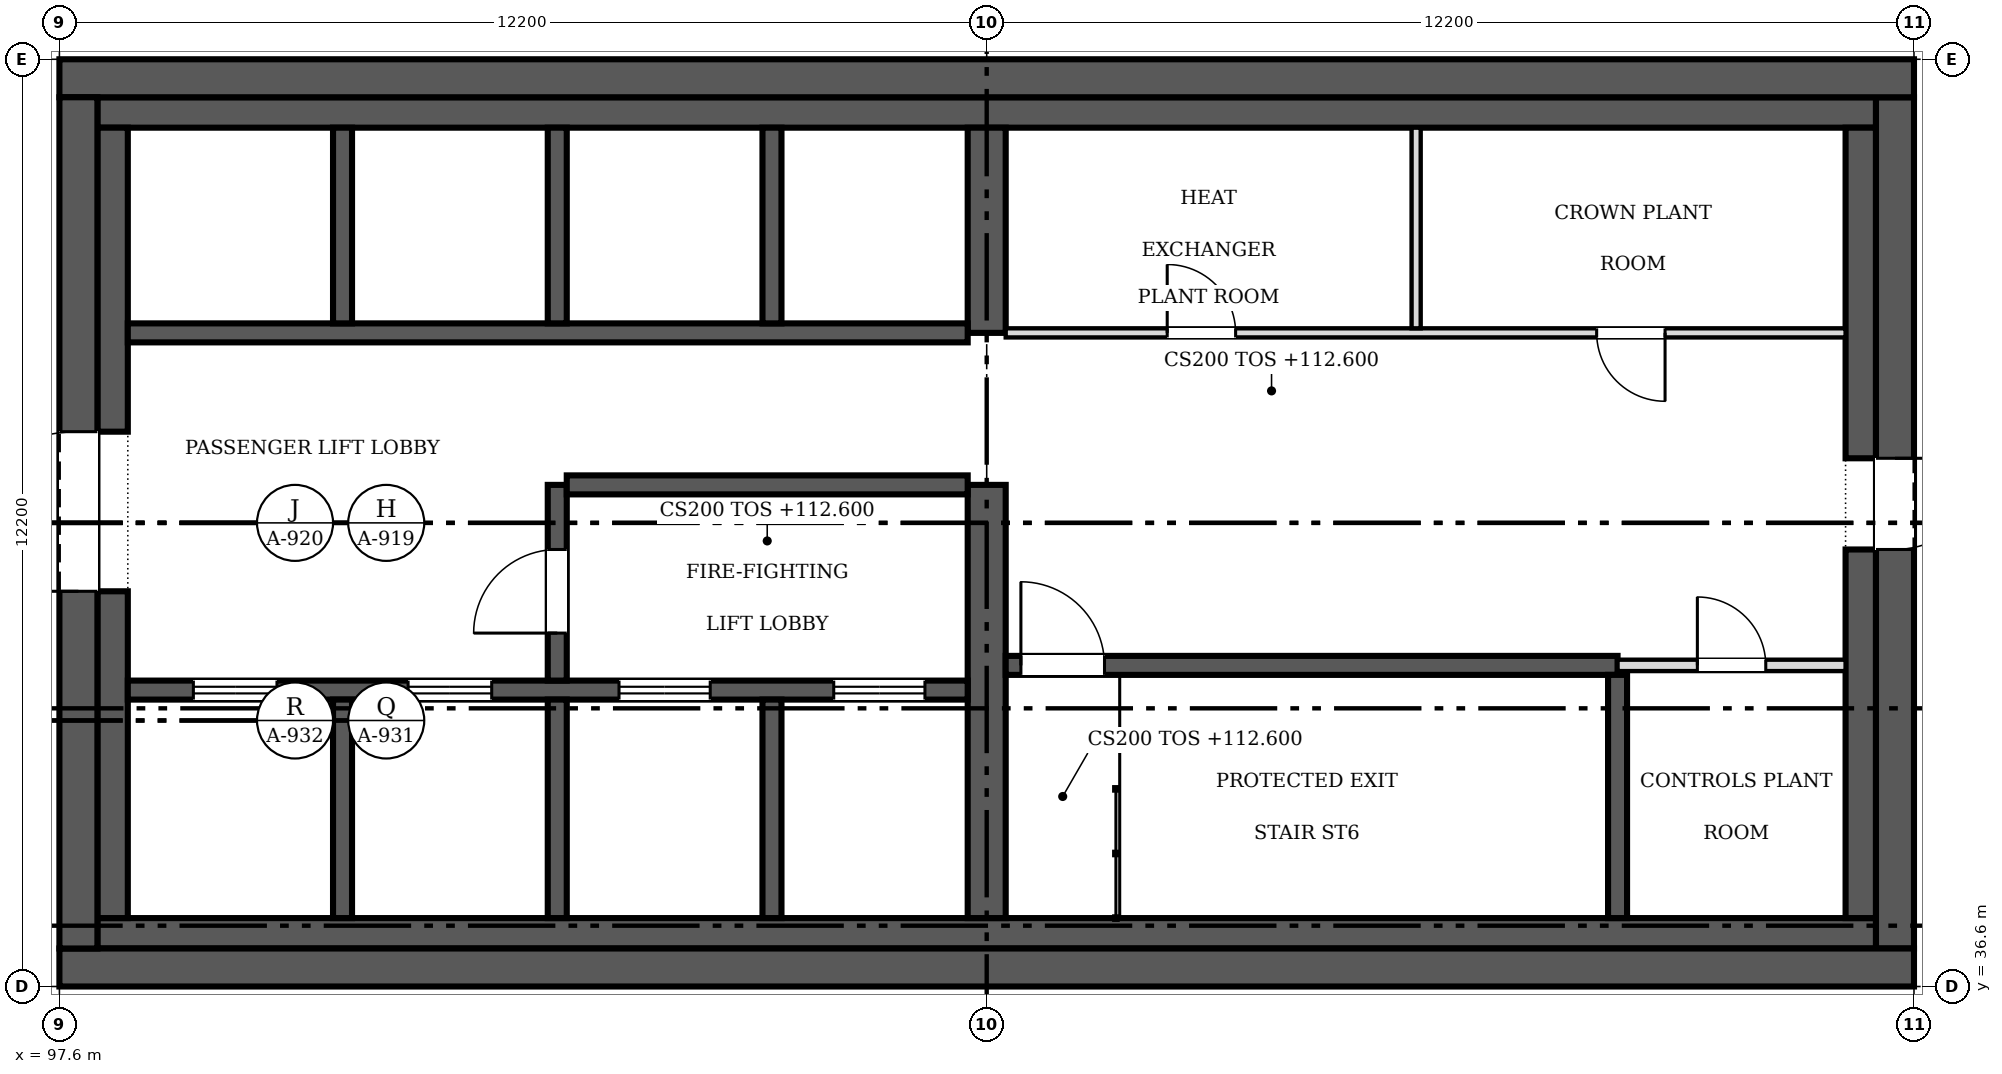
"""IFC4 building model, lengths in metres.
Left out: names, types, materials, properties, quantities, classifications, styles, units other than length and angle.
Written with IfcOpenShell. Run it as: python <this file> out.ifc"""

import sys

from ifc_helpers import new_model, si_unit, direction, frame, frame_2d, origin, place, context, subcontext, project, spatial, rectangle, extrude, source, transform, mapped, element, fill, save


model = new_model("IFC4")
c1 = context("Model", 3, precision=1e-05, world=origin(), true_north=direction((0.0, 1.0)))
c2 = subcontext(c1, "Body", "Model", "MODEL_VIEW")
j1 = project(units=[si_unit("LENGTHUNIT", "METRE"), si_unit("PLANEANGLEUNIT", "RADIAN")], contexts=[c1])
p1 = place(None, origin())
s1 = spatial("IfcSite", under=j1, at=p1, CompositionType="ELEMENT")
p2 = place(p1, origin())
s2 = spatial("IfcBuilding", under=s1, at=p2, CompositionType="ELEMENT")
p3 = place(p2, frame((0.0, 0.0, 112.6)))
s3 = spatial("IfcBuildingStorey", under=s2, at=p3, CompositionType="ELEMENT", Elevation=112.6)
p4 = place(p3, frame((122.0, 36.85, 0.0), z_axis=(0.0, 0.0, 1.0), x_axis=(-1.0, 0.0, 0.0)))
e1 = element("IfcWall", 1, at=p4, inside=s3, PredefinedType="SHEAR", context=c2, shape_type="SweptSolid", body=[
    extrude(rectangle(XDim=24.4, YDim=0.5, at=frame_2d((12.2, 0.0))), origin(), (0.0, 0.0, 1.0), 3.5),
])
p5 = place(p3, frame((97.85, 37.1, 0.0), z_axis=(0.0, 0.0, 1.0), x_axis=(0.0, 1.0, 0.0)))
e2 = element("IfcWall", 2, at=p5, inside=s3, PredefinedType="SHEAR", context=c2, shape_type="SweptSolid", body=[
    extrude(rectangle(XDim=11.2, YDim=0.5, at=frame_2d((5.6, 0.0))), origin(), (0.0, 0.0, 1.0), 3.5),
])
m1 = source(origin(), c2, "Body", "SweptSolid", [
    extrude(rectangle(XDim=2.1, YDim=2.4, at=frame_2d((1.05, 1.2))), frame((0.0, 0.26, 0.0), z_axis=(0.0, -1.0, 0.0), x_axis=(1.0, 0.0, 0.0)), (0.0, 0.0, 1.0), 0.52),
])
p6 = place(p5, frame((4.7, 0.0, 0.0)))
e3 = element("IfcOpeningElement", 3, at=p6, cuts=e2, PredefinedType="OPENING", context=c2, shape_type="MappedRepresentation", body=[
    mapped(m1, transform((0.0, 0.0, 0.0), scale=1.0)),
])
p7 = place(p3, frame((97.6, 48.55, 0.0), z_axis=(0.0, 0.0, 1.0), x_axis=(1.0, 0.0, 0.0)))
e4 = element("IfcWall", 4, at=p7, inside=s3, PredefinedType="SHEAR", context=c2, shape_type="SweptSolid", body=[
    extrude(rectangle(XDim=24.4, YDim=0.5, at=frame_2d((12.2, 0.0))), origin(), (0.0, 0.0, 1.0), 3.5),
])
p8 = place(p3, frame((121.75, 48.3, 0.0), z_axis=(0.0, 0.0, 1.0), x_axis=(0.0, -1.0, 0.0)))
e5 = element("IfcWall", 5, at=p8, inside=s3, PredefinedType="SHEAR", context=c2, shape_type="SweptSolid", body=[
    extrude(rectangle(XDim=11.2, YDim=0.5, at=frame_2d((5.6, 0.0))), origin(), (0.0, 0.0, 1.0), 3.5),
])
m2 = source(origin(), c2, "Body", "SweptSolid", [
    extrude(rectangle(XDim=1.2, YDim=2.1, at=frame_2d((0.6, 1.05))), frame((0.0, 0.26, 0.0), z_axis=(0.0, -1.0, 0.0), x_axis=(1.0, 0.0, 0.0)), (0.0, 0.0, 1.0), 0.52),
])
p9 = place(p8, frame((4.75, 0.0, 0.0)))
e6 = element("IfcOpeningElement", 6, at=p9, cuts=e5, PredefinedType="OPENING", context=c2, shape_type="MappedRepresentation", body=[
    mapped(m2, transform((0.0, 0.0, 0.0), scale=1.0)),
])
for number, where, z_axis, x_axis in (
    (7, (98.1, 37.3, 0.0), (0.0, 0.0, 1.0), (1.0, 0.0, 0.0)),
    (8, (98.1, 48.1, 0.0), (0.0, 0.0, 1.0), (1.0, 0.0, 0.0)),
):
    element("IfcWall", number, at=place(p3, frame(where, z_axis=z_axis, x_axis=x_axis)), inside=s3, PredefinedType="SOLIDWALL", context=c2, shape_type="SweptSolid", body=[
        extrude(rectangle(XDim=23.4, YDim=0.4, at=frame_2d((11.7, 0.0))), origin(), (0.0, 0.0, 1.0), 3.5),
    ])
p10 = place(p3, frame((98.3, 37.5, 0.0), z_axis=(0.0, 0.0, 1.0), x_axis=(0.0, 1.0, 0.0)))
e9 = element("IfcWall", 9, at=p10, inside=s3, PredefinedType="SOLIDWALL", context=c2, shape_type="SweptSolid", body=[
    extrude(rectangle(XDim=4.3, YDim=0.4, at=frame_2d((2.15, 0.0))), origin(), (0.0, 0.0, 1.0), 3.5),
])
p11 = place(p3, frame((98.3, 43.9, 0.0), z_axis=(0.0, 0.0, 1.0), x_axis=(0.0, 1.0, 0.0)))
e10 = element("IfcWall", 10, at=p11, inside=s3, PredefinedType="SOLIDWALL", context=c2, shape_type="SweptSolid", body=[
    extrude(rectangle(XDim=4.0, YDim=0.4, at=frame_2d((2.0, 0.0))), origin(), (0.0, 0.0, 1.0), 3.5),
])
p12 = place(p3, frame((121.3, 37.5, 0.0), z_axis=(0.0, 0.0, 1.0), x_axis=(0.0, 1.0, 0.0)))
e11 = element("IfcWall", 11, at=p12, inside=s3, PredefinedType="SOLIDWALL", context=c2, shape_type="SweptSolid", body=[
    extrude(rectangle(XDim=4.85, YDim=0.4, at=frame_2d((2.425, 0.0))), origin(), (0.0, 0.0, 1.0), 3.5),
])
p13 = place(p3, frame((121.3, 43.55, 0.0), z_axis=(0.0, 0.0, 1.0), x_axis=(0.0, 1.0, 0.0)))
e12 = element("IfcWall", 12, at=p13, inside=s3, PredefinedType="SOLIDWALL", context=c2, shape_type="SweptSolid", body=[
    extrude(rectangle(XDim=4.35, YDim=0.4, at=frame_2d((2.175, 0.0))), origin(), (0.0, 0.0, 1.0), 3.5),
])
p14 = place(p3, frame((109.8, 37.5, 0.0), z_axis=(0.0, 0.0, 1.0), x_axis=(0.0, 1.0, 0.0)))
e13 = element("IfcWall", 13, at=p14, inside=s3, PredefinedType="SHEAR", context=c2, shape_type="SweptSolid", body=[
    extrude(rectangle(XDim=5.7, YDim=0.5, at=frame_2d((2.85, 0.0))), origin(), (0.0, 0.0, 1.0), 3.5),
])
p15 = place(p3, frame((109.8, 45.2, 0.0), z_axis=(0.0, 0.0, 1.0), x_axis=(0.0, 1.0, 0.0)))
e14 = element("IfcWall", 14, at=p15, inside=s3, PredefinedType="SHEAR", context=c2, shape_type="SweptSolid", body=[
    extrude(rectangle(XDim=2.7, YDim=0.5, at=frame_2d((1.35, 0.0))), origin(), (0.0, 0.0, 1.0), 3.5),
])
p16 = place(p3, frame((98.5, 40.5, 0.0), z_axis=(0.0, 0.0, 1.0), x_axis=(1.0, 0.0, 0.0)))
e15 = element("IfcWall", 15, at=p16, inside=s3, PredefinedType="SOLIDWALL", context=c2, shape_type="SweptSolid", body=[
    extrude(rectangle(XDim=11.05, YDim=0.25, at=frame_2d((5.525, 0.0))), origin(), (0.0, 0.0, 1.0), 3.5),
])
m3 = source(origin(), c2, "Body", "SweptSolid", [
    extrude(rectangle(XDim=1.1, YDim=2.1, at=frame_2d((0.55, 1.05))), frame((0.0, 0.135, 0.0), z_axis=(0.0, -1.0, 0.0), x_axis=(1.0, 0.0, 0.0)), (0.0, 0.0, 1.0), 0.27),
])
p17 = place(p16, frame((0.863, 0.0, 0.0)))
e16 = element("IfcOpeningElement", 16, at=p17, cuts=e15, PredefinedType="OPENING", context=c2, shape_type="MappedRepresentation", body=[
    mapped(m3, transform((0.0, 0.0, 0.0), scale=1.0)),
])
p18 = place(p16, frame((3.688, 0.0, 0.0)))
e17 = element("IfcOpeningElement", 17, at=p18, cuts=e15, PredefinedType="OPENING", context=c2, shape_type="MappedRepresentation", body=[
    mapped(m3, transform((0.0, 0.0, 0.0), scale=1.0)),
])
m4 = source(origin(), c2, "Body", "SweptSolid", [
    extrude(rectangle(XDim=1.2, YDim=2.1, at=frame_2d((0.6, 1.05))), frame((0.0, 0.135, 0.0), z_axis=(0.0, -1.0, 0.0), x_axis=(1.0, 0.0, 0.0)), (0.0, 0.0, 1.0), 0.27),
])
p19 = place(p16, frame((6.462, 0.0, 0.0)))
e18 = element("IfcOpeningElement", 18, at=p19, cuts=e15, PredefinedType="OPENING", context=c2, shape_type="MappedRepresentation", body=[
    mapped(m4, transform((0.0, 0.0, 0.0), scale=1.0)),
])
p20 = place(p16, frame((9.288, 0.0, 0.0)))
e19 = element("IfcOpeningElement", 19, at=p20, cuts=e15, PredefinedType="OPENING", context=c2, shape_type="MappedRepresentation", body=[
    mapped(m4, transform((0.0, 0.0, 0.0), scale=1.0)),
])
p21 = place(p3, frame((98.5, 45.2, 0.0), z_axis=(0.0, 0.0, 1.0), x_axis=(1.0, 0.0, 0.0)))
e20 = element("IfcWall", 20, at=p21, inside=s3, PredefinedType="SOLIDWALL", context=c2, shape_type="SweptSolid", body=[
    extrude(rectangle(XDim=11.05, YDim=0.25, at=frame_2d((5.525, 0.0))), origin(), (0.0, 0.0, 1.0), 3.5),
])
p22 = place(p3, frame((118.1, 40.825, 0.0), z_axis=(0.0, 0.0, 1.0), x_axis=(-1.0, 0.0, 0.0)))
e21 = element("IfcWall", 21, at=p22, inside=s3, PredefinedType="SOLIDWALL", context=c2, shape_type="SweptSolid", body=[
    extrude(rectangle(XDim=8.05, YDim=0.25, at=frame_2d((4.025, 0.0))), origin(), (0.0, 0.0, 1.0), 3.5),
])
p23 = place(p22, frame((6.75, 0.0, 0.0)))
e22 = element("IfcOpeningElement", 22, at=p23, cuts=e21, PredefinedType="OPENING", context=c2, shape_type="MappedRepresentation", body=[
    mapped(m3, transform((0.0, 0.0, 0.0), scale=1.0)),
])
p24 = place(p3, frame((104.15, 37.5, 0.0), z_axis=(0.0, 0.0, 1.0), x_axis=(0.0, 1.0, 0.0)))
e23 = element("IfcWall", 23, at=p24, inside=s3, PredefinedType="SOLIDWALL", context=c2, shape_type="SweptSolid", body=[
    extrude(rectangle(XDim=2.875, YDim=0.25, at=frame_2d((1.438, 0.0))), origin(), (0.0, 0.0, 1.0), 3.5),
])
p25 = place(p3, frame((104.15, 43.2, 0.0), z_axis=(0.0, 0.0, 1.0), x_axis=(0.0, -1.0, 0.0)))
e24 = element("IfcWall", 24, at=p25, inside=s3, PredefinedType="SOLIDWALL", context=c2, shape_type="SweptSolid", body=[
    extrude(rectangle(XDim=2.575, YDim=0.25, at=frame_2d((1.288, 0.0))), origin(), (0.0, 0.0, 1.0), 3.5),
])
p26 = place(p25, frame((0.85, 0.0, 0.0)))
e25 = element("IfcOpeningElement", 25, at=p26, cuts=e24, PredefinedType="OPENING", context=c2, shape_type="MappedRepresentation", body=[
    mapped(m3, transform((0.0, 0.0, 0.0), scale=1.0)),
])
p27 = place(p3, frame((104.275, 43.2, 0.0), z_axis=(0.0, 0.0, 1.0), x_axis=(1.0, 0.0, 0.0)))
e26 = element("IfcWall", 26, at=p27, inside=s3, PredefinedType="SOLIDWALL", context=c2, shape_type="SweptSolid", body=[
    extrude(rectangle(XDim=5.275, YDim=0.25, at=frame_2d((2.638, 0.0))), origin(), (0.0, 0.0, 1.0), 3.5),
])
p28 = place(p3, frame((118.1, 37.5, 0.0), z_axis=(0.0, 0.0, 1.0), x_axis=(0.0, 1.0, 0.0)))
e27 = element("IfcWall", 27, at=p28, inside=s3, PredefinedType="SOLIDWALL", context=c2, shape_type="SweptSolid", body=[
    extrude(rectangle(XDim=3.2, YDim=0.25, at=frame_2d((1.6, 0.0))), origin(), (0.0, 0.0, 1.0), 3.5),
])
for number, where, z_axis, x_axis in (
    (28, (101.325, 37.5, 0.0), (0.0, 0.0, 1.0), (0.0, 1.0, 0.0)),
    (29, (106.975, 37.5, 0.0), (0.0, 0.0, 1.0), (0.0, 1.0, 0.0)),
):
    element("IfcWall", number, at=place(p3, frame(where, z_axis=z_axis, x_axis=x_axis)), inside=s3, PredefinedType="SOLIDWALL", context=c2, shape_type="SweptSolid", body=[
        extrude(rectangle(XDim=2.875, YDim=0.25, at=frame_2d((1.438, 0.0))), origin(), (0.0, 0.0, 1.0), 3.5),
    ])
for number, where, z_axis, x_axis in (
    (30, (101.325, 45.325, 0.0), (0.0, 0.0, 1.0), (0.0, 1.0, 0.0)),
    (31, (104.15, 45.325, 0.0), (0.0, 0.0, 1.0), (0.0, 1.0, 0.0)),
    (32, (106.975, 45.325, 0.0), (0.0, 0.0, 1.0), (0.0, 1.0, 0.0)),
):
    element("IfcWall", number, at=place(p3, frame(where, z_axis=z_axis, x_axis=x_axis)), inside=s3, PredefinedType="SOLIDWALL", context=c2, shape_type="SweptSolid", body=[
        extrude(rectangle(XDim=2.575, YDim=0.25, at=frame_2d((1.288, 0.0))), origin(), (0.0, 0.0, 1.0), 3.5),
    ])
p29 = place(p3, frame((110.05, 45.2, 0.0), z_axis=(0.0, 0.0, 1.0), x_axis=(1.0, 0.0, 0.0)))
e33 = element("IfcWall", 33, at=p29, inside=s3, PredefinedType="PARTITIONING", context=c2, shape_type="SweptSolid", body=[
    extrude(rectangle(XDim=11.05, YDim=0.12, at=frame_2d((5.525, 0.0))), origin(), (0.0, 0.0, 1.0), 3.5),
])
m5 = source(origin(), c2, "Body", "SweptSolid", [
    extrude(rectangle(XDim=0.9, YDim=2.1, at=frame_2d((0.45, 1.05))), frame((0.0, 0.07, 0.0), z_axis=(0.0, -1.0, 0.0), x_axis=(1.0, 0.0, 0.0)), (0.0, 0.0, 1.0), 0.14),
])
p30 = place(p29, frame((2.125, 0.0, 0.0)))
e34 = element("IfcOpeningElement", 34, at=p30, cuts=e33, PredefinedType="OPENING", context=c2, shape_type="MappedRepresentation", body=[
    mapped(m5, transform((0.0, 0.0, 0.0), scale=1.0)),
])
p31 = place(p29, frame((7.775, 0.0, 0.0)))
e35 = element("IfcOpeningElement", 35, at=p31, cuts=e33, PredefinedType="OPENING", context=c2, shape_type="MappedRepresentation", body=[
    mapped(m5, transform((0.0, 0.0, 0.0), scale=1.0)),
])
p32 = place(p3, frame((121.1, 40.825, 0.0), z_axis=(0.0, 0.0, 1.0), x_axis=(-1.0, 0.0, 0.0)))
e36 = element("IfcWall", 36, at=p32, inside=s3, PredefinedType="PARTITIONING", context=c2, shape_type="SweptSolid", body=[
    extrude(rectangle(XDim=3.0, YDim=0.15, at=frame_2d((1.5, 0.0))), origin(), (0.0, 0.0, 1.0), 3.5),
])
m6 = source(origin(), c2, "Body", "SweptSolid", [
    extrude(rectangle(XDim=0.9, YDim=2.1, at=frame_2d((0.45, 1.05))), frame((0.0, 0.085, 0.0), z_axis=(0.0, -1.0, 0.0), x_axis=(1.0, 0.0, 0.0)), (0.0, 0.0, 1.0), 0.17),
])
p33 = place(p32, frame((1.05, 0.0, 0.0)))
e37 = element("IfcOpeningElement", 37, at=p33, cuts=e36, PredefinedType="OPENING", context=c2, shape_type="MappedRepresentation", body=[
    mapped(m6, transform((0.0, 0.0, 0.0), scale=1.0)),
])
p34 = place(p3, frame((115.45, 45.26, 0.0), z_axis=(0.0, 0.0, 1.0), x_axis=(0.0, 1.0, 0.0)))
e38 = element("IfcWall", 38, at=p34, inside=s3, PredefinedType="PARTITIONING", context=c2, shape_type="SweptSolid", body=[
    extrude(rectangle(XDim=2.64, YDim=0.12, at=frame_2d((1.32, 0.0))), origin(), (0.0, 0.0, 1.0), 3.5),
])
m7 = source(origin(), c2, "Body", "SweptSolid", [
    extrude(rectangle(XDim=2.1, YDim=2.4, at=frame_2d((1.05, 1.2))), frame((0.0, 0.025, 0.0), z_axis=(0.0, -1.0, 0.0), x_axis=(1.0, 0.0, 0.0)), (0.0, 0.0, 1.0), 0.05),
])
p35 = place(p6, origin())
e39 = element("IfcDoor", 39, at=p35, inside=s3, OperationType="DOUBLE_DOOR_SINGLE_SWING", PredefinedType="DOOR", context=c2, shape_type="MappedRepresentation", body=[
    mapped(m7, transform((0.0, 0.0, 0.0), scale=1.0)),
])
fill(e3, e39)
m8 = source(origin(), c2, "Body", "SweptSolid", [
    extrude(rectangle(XDim=1.2, YDim=2.1, at=frame_2d((0.6, 1.05))), frame((0.0, 0.025, 0.0), z_axis=(0.0, -1.0, 0.0), x_axis=(1.0, 0.0, 0.0)), (0.0, 0.0, 1.0), 0.05),
])
p36 = place(p9, origin())
e40 = element("IfcDoor", 40, at=p36, inside=s3, OperationType="SINGLE_SWING_LEFT", PredefinedType="DOOR", context=c2, shape_type="MappedRepresentation", body=[
    mapped(m8, transform((0.0, 0.0, 0.0), scale=1.0)),
])
fill(e6, e40)
m9 = source(origin(), c2, "Body", "SweptSolid", [
    extrude(rectangle(XDim=1.1, YDim=2.1, at=frame_2d((0.55, 1.05))), frame((0.0, 0.025, 0.0), z_axis=(0.0, -1.0, 0.0), x_axis=(1.0, 0.0, 0.0)), (0.0, 0.0, 1.0), 0.05),
])
p37 = place(p17, origin())
e41 = element("IfcDoor", 41, at=p37, inside=s3, OperationType="DOUBLE_DOOR_SLIDING", PredefinedType="DOOR", context=c2, shape_type="MappedRepresentation", body=[
    mapped(m9, transform((0.0, 0.0, 0.0), scale=1.0)),
])
fill(e16, e41)
p38 = place(p18, origin())
e42 = element("IfcDoor", 42, at=p38, inside=s3, OperationType="DOUBLE_DOOR_SLIDING", PredefinedType="DOOR", context=c2, shape_type="MappedRepresentation", body=[
    mapped(m9, transform((0.0, 0.0, 0.0), scale=1.0)),
])
fill(e17, e42)
p39 = place(p19, origin())
e43 = element("IfcDoor", 43, at=p39, inside=s3, OperationType="DOUBLE_DOOR_SLIDING", PredefinedType="DOOR", context=c2, shape_type="MappedRepresentation", body=[
    mapped(m8, transform((0.0, 0.0, 0.0), scale=1.0)),
])
fill(e18, e43)
p40 = place(p20, origin())
e44 = element("IfcDoor", 44, at=p40, inside=s3, OperationType="DOUBLE_DOOR_SLIDING", PredefinedType="DOOR", context=c2, shape_type="MappedRepresentation", body=[
    mapped(m8, transform((0.0, 0.0, 0.0), scale=1.0)),
])
fill(e19, e44)
p41 = place(p23, origin())
e45 = element("IfcDoor", 45, at=p41, inside=s3, OperationType="SINGLE_SWING_RIGHT", PredefinedType="DOOR", context=c2, shape_type="MappedRepresentation", body=[
    mapped(m9, transform((0.0, 0.0, 0.0), scale=1.0)),
])
fill(e22, e45)
p42 = place(p26, origin())
e46 = element("IfcDoor", 46, at=p42, inside=s3, OperationType="SINGLE_SWING_RIGHT", PredefinedType="DOOR", context=c2, shape_type="MappedRepresentation", body=[
    mapped(m9, transform((0.0, 0.0, 0.0), scale=1.0)),
])
fill(e25, e46)
m10 = source(origin(), c2, "Body", "SweptSolid", [
    extrude(rectangle(XDim=0.9, YDim=2.1, at=frame_2d((0.45, 1.05))), frame((0.0, 0.025, 0.0), z_axis=(0.0, -1.0, 0.0), x_axis=(1.0, 0.0, 0.0)), (0.0, 0.0, 1.0), 0.05),
])
p43 = place(p30, origin())
e47 = element("IfcDoor", 47, at=p43, inside=s3, OperationType="SINGLE_SWING_LEFT", PredefinedType="DOOR", context=c2, shape_type="MappedRepresentation", body=[
    mapped(m10, transform((0.0, 0.0, 0.0), scale=1.0)),
])
fill(e34, e47)
p44 = place(p31, origin())
e48 = element("IfcDoor", 48, at=p44, inside=s3, OperationType="SINGLE_SWING_RIGHT", PredefinedType="DOOR", context=c2, shape_type="MappedRepresentation", body=[
    mapped(m10, transform((0.0, 0.0, 0.0), scale=1.0)),
])
fill(e35, e48)
p45 = place(p33, origin())
e49 = element("IfcDoor", 49, at=p45, inside=s3, OperationType="SINGLE_SWING_RIGHT", PredefinedType="DOOR", context=c2, shape_type="MappedRepresentation", body=[
    mapped(m10, transform((0.0, 0.0, 0.0), scale=1.0)),
])
fill(e37, e49)
save(model, sys.argv[1])
